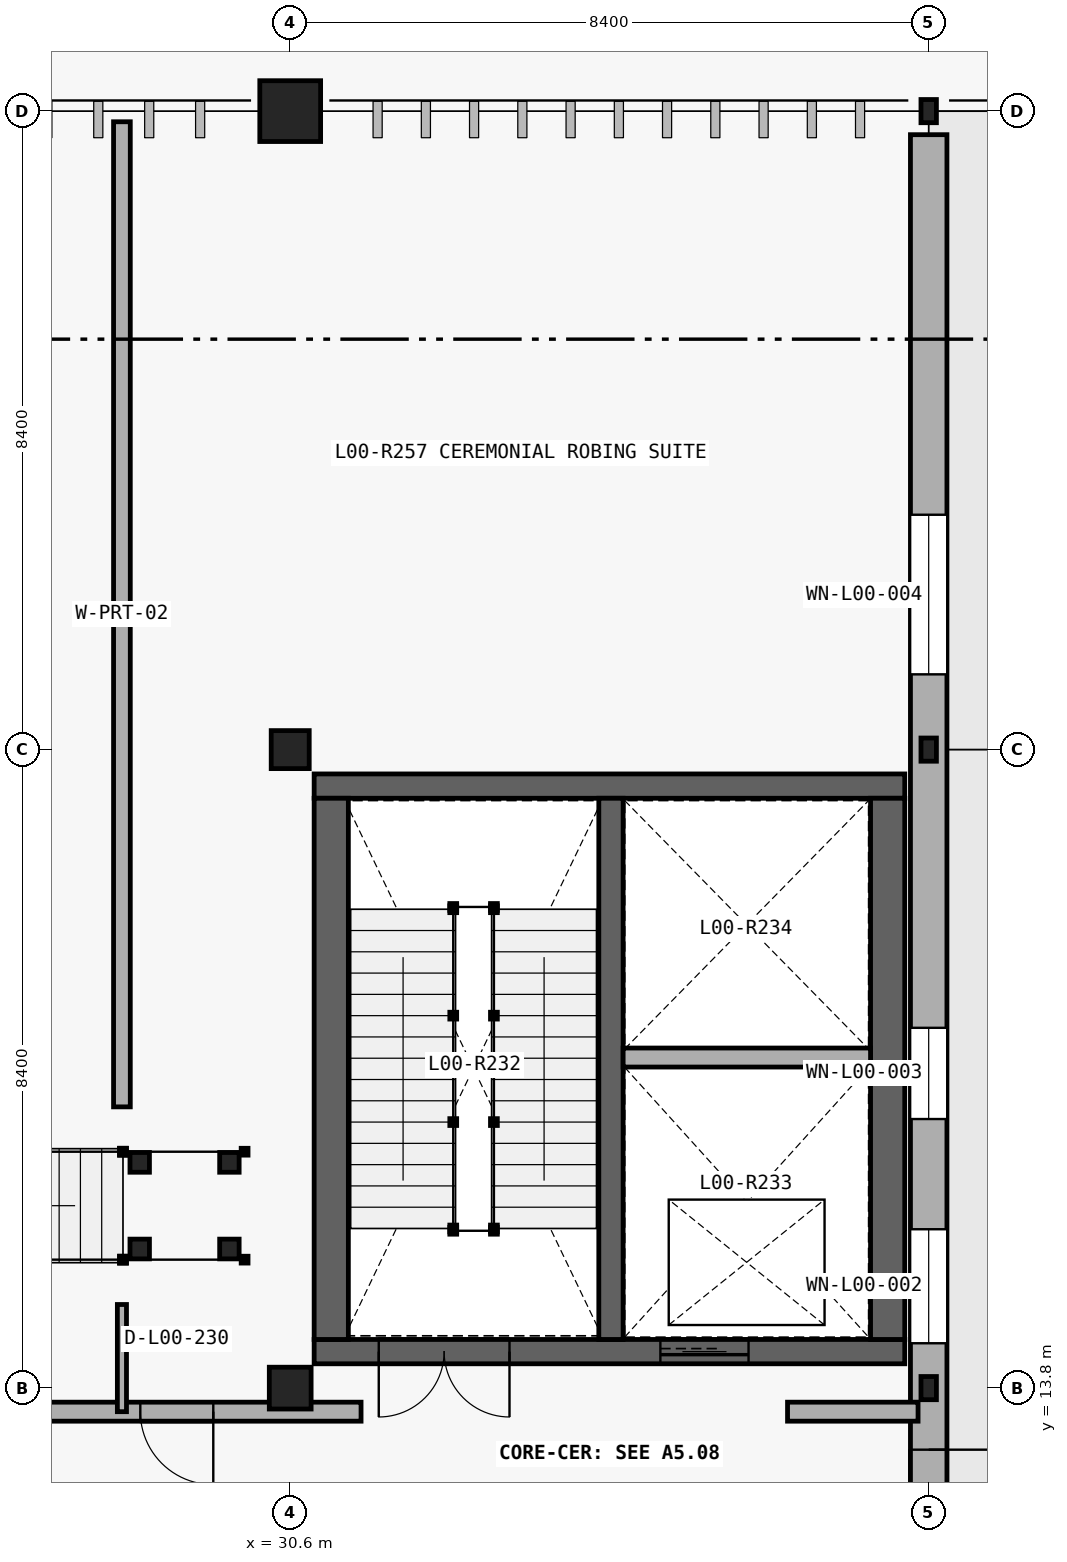
"""IFC4 building model, lengths in metres.
Left out: names, types, materials, properties, quantities, classifications, styles, units other than length and angle.
Written with IfcOpenShell. Run it as: python <this file> out.ifc"""

import sys

from ifc_helpers import new_model, si_unit, direction, frame, frame_2d, origin_with_axes, origin_2d_with_axis, place, context, subcontext, project, spatial, rectangle, hollow_rectangle, circle, i_section, extrude, element, fill, save


model = new_model("IFC4")
c1 = context("Model", 3, precision=1e-05, world=origin_with_axes(), true_north=direction((0.0, 1.0)))
c2 = subcontext(c1, "Body", "Model", "MODEL_VIEW")
j1 = project(units=[si_unit("LENGTHUNIT", "METRE"), si_unit("PLANEANGLEUNIT", "RADIAN")], contexts=[c1])
p1 = place(None, origin_with_axes())
s1 = spatial("IfcSite", under=j1, at=p1, CompositionType="ELEMENT")
p2 = place(p1, origin_with_axes())
s2 = spatial("IfcBuilding", under=s1, at=p2, CompositionType="ELEMENT")
p3 = place(p2, origin_with_axes())
s3 = spatial("IfcBuildingStorey", under=s2, at=p3, CompositionType="ELEMENT", Elevation=0.0)
p4 = place(None, frame((39.0, 6.34, 0.0), z_axis=(0.0, 0.0, 1.0), x_axis=(0.0, 1.0, 0.0)))
e1 = element("IfcWall", 1, at=p4, inside=s3, PredefinedType="SOLIDWALL", context=c2, shape_type="SweptSolid", body=[
    extrude(rectangle(XDim=23.95, YDim=0.48, at=frame_2d((11.975, 0.0), x_axis=(1.0, 0.0))), origin_with_axes(), (0.0, 0.0, 1.0), 4.664),
])
p5 = place(None, frame((39.0, 12.04, 0.0), z_axis=(0.0, 0.0, 1.0), x_axis=(0.0, 1.0, 0.0)))
e2 = element("IfcOpeningElement", 2, at=p5, cuts=e1, PredefinedType="OPENING", context=c2, shape_type="SweptSolid", body=[
    extrude(rectangle(XDim=1.9, YDim=2.4, at=frame_2d((0.0, 1.2), x_axis=(1.0, 0.0))), frame((0.0, 0.25, 0.0), z_axis=(0.0, -1.0, 0.0), x_axis=(1.0, 0.0, 0.0)), (0.0, 0.0, 1.0), 0.5),
])
p6 = place(None, frame((39.0, 9.44, 0.364), z_axis=(0.0, 0.0, 1.0), x_axis=(0.0, 1.0, 0.0)))
e3 = element("IfcOpeningElement", 3, at=p6, cuts=e1, PredefinedType="OPENING", context=c2, shape_type="SweptSolid", body=[
    extrude(rectangle(XDim=1.8, YDim=4.2, at=frame_2d((0.0, 2.1), x_axis=(1.0, 0.0))), frame((0.0, 0.25, 0.0), z_axis=(0.0, -1.0, 0.0), x_axis=(1.0, 0.0, 0.0)), (0.0, 0.0, 1.0), 0.5),
])
p7 = place(None, frame((39.0, 15.14, 0.764), z_axis=(0.0, 0.0, 1.0), x_axis=(0.0, 1.0, 0.0)))
e4 = element("IfcOpeningElement", 4, at=p7, cuts=e1, PredefinedType="OPENING", context=c2, shape_type="SweptSolid", body=[
    extrude(rectangle(XDim=1.5, YDim=3.8, at=frame_2d((0.0, 1.9), x_axis=(1.0, 0.0))), frame((0.0, 0.25, 0.0), z_axis=(0.0, -1.0, 0.0), x_axis=(1.0, 0.0, 0.0)), (0.0, 0.0, 1.0), 0.5),
])
p8 = place(None, frame((39.0, 17.94, 1.1), z_axis=(0.0, 0.0, 1.0), x_axis=(0.0, 1.0, 0.0)))
e5 = element("IfcOpeningElement", 5, at=p8, cuts=e1, PredefinedType="OPENING", context=c2, shape_type="SweptSolid", body=[
    extrude(rectangle(XDim=1.2, YDim=3.4, at=frame_2d((0.0, 1.7), x_axis=(1.0, 0.0))), frame((0.0, 0.25, 0.0), z_axis=(0.0, -1.0, 0.0), x_axis=(1.0, 0.0, 0.0)), (0.0, 0.0, 1.0), 0.5),
])
p9 = place(None, frame((39.0, 24.24, 0.85), z_axis=(0.0, 0.0, 1.0), x_axis=(0.0, 1.0, 0.0)))
e6 = element("IfcOpeningElement", 6, at=p9, cuts=e1, PredefinedType="OPENING", context=c2, shape_type="SweptSolid", body=[
    extrude(rectangle(XDim=2.1, YDim=3.3, at=frame_2d((0.0, 1.65), x_axis=(1.0, 0.0))), frame((0.0, 0.25, 0.0), z_axis=(0.0, -1.0, 0.0), x_axis=(1.0, 0.0, 0.0)), (0.0, 0.0, 1.0), 0.5),
])
p10 = place(None, frame((30.915, 14.28, 0.0), z_axis=(0.0, 0.0, 1.0), x_axis=(1.0, 0.0, 0.0)))
e7 = element("IfcWall", 7, at=p10, inside=s3, PredefinedType="SHEAR", context=c2, shape_type="SweptSolid", body=[
    extrude(rectangle(XDim=7.77, YDim=0.32, at=frame_2d((3.885, 0.0), x_axis=(1.0, 0.0))), origin_with_axes(), (0.0, 0.0, 1.0), 5.4),
])
p11 = place(None, frame((32.625, 14.28, 0.0), z_axis=(0.0, 0.0, 1.0), x_axis=(1.0, 0.0, 0.0)))
e8 = element("IfcOpeningElement", 8, at=p11, cuts=e7, PredefinedType="OPENING", context=c2, shape_type="SweptSolid", body=[
    extrude(rectangle(XDim=1.72, YDim=2.18, at=frame_2d((0.0, 1.09), x_axis=(1.0, 0.0))), frame((0.0, 0.17, 0.0), z_axis=(0.0, -1.0, 0.0), x_axis=(1.0, 0.0, 0.0)), (0.0, 0.0, 1.0), 0.34),
])
p12 = place(None, frame((36.05, 14.28, 0.0), z_axis=(0.0, 0.0, 1.0), x_axis=(1.0, 0.0, 0.0)))
e9 = element("IfcOpeningElement", 9, at=p12, cuts=e7, PredefinedType="OPENING", context=c2, shape_type="SweptSolid", body=[
    extrude(rectangle(XDim=1.16, YDim=2.2, at=frame_2d((0.0, 1.1), x_axis=(1.0, 0.0))), frame((0.0, 0.17, 0.0), z_axis=(0.0, -1.0, 0.0), x_axis=(1.0, 0.0, 0.0)), (0.0, 0.0, 1.0), 0.34),
])
p13 = place(None, frame((38.685, 21.72, 0.0), z_axis=(0.0, 0.0, 1.0), x_axis=(-1.0, 0.0, 0.0)))
e10 = element("IfcWall", 10, at=p13, inside=s3, PredefinedType="SHEAR", context=c2, shape_type="SweptSolid", body=[
    extrude(rectangle(XDim=7.77, YDim=0.32, at=frame_2d((3.885, 0.0), x_axis=(1.0, 0.0))), origin_with_axes(), (0.0, 0.0, 1.0), 5.4),
])
for number, where, z_axis, x_axis in (
    (11, (38.46, 14.44, 0.0), (0.0, 0.0, 1.0), (0.0, 1.0, 0.0)),
    (12, (31.14, 21.56, 0.0), (0.0, 0.0, 1.0), (0.0, -1.0, 0.0)),
):
    element("IfcWall", number, at=place(None, frame(where, z_axis=z_axis, x_axis=x_axis)), inside=s3, PredefinedType="SHEAR", context=c2, shape_type="SweptSolid", body=[
        extrude(rectangle(XDim=7.12, YDim=0.45, at=frame_2d((3.56, 0.0), x_axis=(1.0, 0.0))), origin_with_axes(), (0.0, 0.0, 1.0), 5.4),
    ])
p14 = place(None, frame((34.82, 14.44, 0.0), z_axis=(0.0, 0.0, 1.0), x_axis=(0.0, 1.0, 0.0)))
e13 = element("IfcWall", 13, at=p14, inside=s3, PredefinedType="SHEAR", context=c2, shape_type="SweptSolid", body=[
    extrude(rectangle(XDim=7.12, YDim=0.32, at=frame_2d((3.56, 0.0), x_axis=(1.0, 0.0))), origin_with_axes(), (0.0, 0.0, 1.0), 5.4),
])
p15 = place(None, frame((34.98, 18.149, 0.0), z_axis=(0.0, 0.0, 1.0), x_axis=(1.0, 0.0, 0.0)))
e14 = element("IfcWall", 14, at=p15, inside=s3, PredefinedType="PARTITIONING", context=c2, shape_type="SweptSolid", body=[
    extrude(rectangle(XDim=3.255, YDim=0.25, at=frame_2d((1.627, 0.0), x_axis=(1.0, 0.0))), origin_with_axes(), (0.0, 0.0, 1.0), 5.08),
])
p16 = place(None, frame((6.22, 13.49, 0.0), z_axis=(0.0, 0.0, 1.0), x_axis=(1.0, 0.0, 0.0)))
e15 = element("IfcWall", 15, at=p16, inside=s3, PredefinedType="PARTITIONING", context=c2, shape_type="SweptSolid", body=[
    extrude(rectangle(XDim=25.312, YDim=0.25, at=frame_2d((12.656, 0.0), x_axis=(1.0, 0.0))), origin_with_axes(), (0.0, 0.0, 1.0), 4.15),
])
p17 = place(None, frame((8.342, 13.49, 0.0), z_axis=(0.0, 0.0, 1.0), x_axis=(1.0, 0.0, 0.0)))
e16 = element("IfcOpeningElement", 16, at=p17, cuts=e15, PredefinedType="OPENING", context=c2, shape_type="SweptSolid", body=[
    extrude(rectangle(XDim=0.91, YDim=2.12, at=frame_2d((0.0, 1.06), x_axis=(1.0, 0.0))), frame((0.0, 0.135, 0.0), z_axis=(0.0, -1.0, 0.0), x_axis=(1.0, 0.0, 0.0)), (0.0, 0.0, 1.0), 0.27),
])
p18 = place(None, frame((18.963, 13.49, 0.0), z_axis=(0.0, 0.0, 1.0), x_axis=(1.0, 0.0, 0.0)))
e17 = element("IfcOpeningElement", 17, at=p18, cuts=e15, PredefinedType="OPENING", context=c2, shape_type="SweptSolid", body=[
    extrude(rectangle(XDim=1.0, YDim=2.28, at=frame_2d((0.0, 1.14), x_axis=(1.0, 0.0))), frame((0.0, 0.135, 0.0), z_axis=(0.0, -1.0, 0.0), x_axis=(1.0, 0.0, 0.0)), (0.0, 0.0, 1.0), 0.27),
])
p19 = place(None, frame((29.108, 13.49, 0.0), z_axis=(0.0, 0.0, 1.0), x_axis=(1.0, 0.0, 0.0)))
e18 = element("IfcOpeningElement", 18, at=p19, cuts=e15, PredefinedType="OPENING", context=c2, shape_type="SweptSolid", body=[
    extrude(rectangle(XDim=0.96, YDim=2.2, at=frame_2d((0.0, 1.1), x_axis=(1.0, 0.0))), frame((0.0, 0.135, 0.0), z_axis=(0.0, -1.0, 0.0), x_axis=(1.0, 0.0, 0.0)), (0.0, 0.0, 1.0), 0.27),
])
p20 = place(None, frame((37.143, 13.49, 0.0), z_axis=(0.0, 0.0, 1.0), x_axis=(1.0, 0.0, 0.0)))
e19 = element("IfcWall", 19, at=p20, inside=s3, PredefinedType="PARTITIONING", context=c2, shape_type="SweptSolid", body=[
    extrude(rectangle(XDim=1.717, YDim=0.25, at=frame_2d((0.859, 0.0), x_axis=(1.0, 0.0))), origin_with_axes(), (0.0, 0.0, 1.0), 4.382),
])
p21 = place(None, frame((28.386, 13.49, 0.0), z_axis=(0.0, 0.0, 1.0), x_axis=(0.0, 1.0, 0.0)))
e20 = element("IfcWall", 20, at=p21, inside=s3, PredefinedType="PARTITIONING", context=c2, shape_type="SweptSolid", body=[
    extrude(rectangle(XDim=1.41, YDim=0.12, at=frame_2d((0.705, 0.0), x_axis=(1.0, 0.0))), origin_with_axes(), (0.0, 0.0, 1.0), 5.08),
])
p22 = place(None, frame((28.386, 17.5, 0.0), z_axis=(0.0, 0.0, 1.0), x_axis=(0.0, 1.0, 0.0)))
e21 = element("IfcWall", 21, at=p22, inside=s3, PredefinedType="PARTITIONING", context=c2, shape_type="SweptSolid", body=[
    extrude(rectangle(XDim=12.96, YDim=0.22, at=frame_2d((6.48, 0.0), x_axis=(1.0, 0.0))), origin_with_axes(), (0.0, 0.0, 1.0), 5.08),
])
p23 = place(None, frame((30.6, 13.8, 0.0), z_axis=(0.0, 0.0, 1.0), x_axis=(1.0, 0.0, 0.0)))
e22 = element("IfcColumn", 22, at=p23, inside=s3, PredefinedType="COLUMN", context=c2, shape_type="SweptSolid", body=[
    extrude(i_section(OverallWidth=0.55, OverallDepth=0.55, WebThickness=0.025, FlangeThickness=0.042, at=origin_2d_with_axis()), origin_with_axes(), (0.0, 0.0, 1.0), 5.4),
])
p24 = place(None, frame((30.6, 22.2, 0.0), z_axis=(0.0, 0.0, 1.0), x_axis=(1.0, 0.0, 0.0)))
e23 = element("IfcColumn", 23, at=p24, inside=s3, PredefinedType="COLUMN", context=c2, shape_type="SweptSolid", body=[
    extrude(i_section(OverallWidth=0.5, OverallDepth=0.5, WebThickness=0.022, FlangeThickness=0.036, at=origin_2d_with_axis()), origin_with_axes(), (0.0, 0.0, 1.0), 5.4),
])
p25 = place(None, frame((30.6, 30.6, 0.0), z_axis=(0.0, 0.0, 1.0), x_axis=(1.0, 0.0, 0.0)))
e24 = element("IfcColumn", 24, at=p25, inside=s3, PredefinedType="COLUMN", context=c2, shape_type="SweptSolid", body=[
    extrude(circle(Radius=0.4, at=origin_2d_with_axis()), origin_with_axes(), (0.0, 0.0, 1.0), 5.4),
])
for number, where, z_axis, x_axis in (
    (25, (39.0, 13.8, 0.0), (0.0, 0.0, 1.0), (1.0, 0.0, 0.0)),
    (26, (39.0, 22.2, 0.0), (0.0, 0.0, 1.0), (1.0, 0.0, 0.0)),
    (27, (39.0, 30.6, 0.0), (0.0, 0.0, 1.0), (1.0, 0.0, 0.0)),
):
    element("IfcColumn", number, at=place(None, frame(where, z_axis=z_axis, x_axis=x_axis)), inside=s3, PredefinedType="COLUMN", context=c2, shape_type="SweptSolid", body=[
        extrude(hollow_rectangle(XDim=0.203, YDim=0.305, WallThickness=0.013, InnerFilletRadius=0.025, OuterFilletRadius=0.013, at=origin_2d_with_axis()), origin_with_axes(), (0.0, 0.0, 1.0), 5.4),
    ])
for number, where, z_axis, x_axis in (
    (28, (28.62, 15.63, -0.28), (0.0, 0.0, 1.0), (1.0, 0.0, 0.0)),
    (29, (28.62, 16.77, -0.28), (0.0, 0.0, 1.0), (1.0, 0.0, 0.0)),
    (30, (29.8, 15.63, -0.28), (0.0, 0.0, 1.0), (1.0, 0.0, 0.0)),
    (31, (29.8, 16.77, -0.28), (0.0, 0.0, 1.0), (1.0, 0.0, 0.0)),
):
    element("IfcColumn", number, at=place(None, frame(where, z_axis=z_axis, x_axis=x_axis)), inside=s3, PredefinedType="COLUMN", context=c2, shape_type="SweptSolid", body=[
        extrude(i_section(OverallWidth=0.256, OverallDepth=0.26, WebThickness=0.011, FlangeThickness=0.017, at=origin_2d_with_axis()), origin_with_axes(), (0.0, 0.0, 1.0), 5.5),
    ])
p26 = place(None, frame((39.0, 12.04, 0.0), z_axis=(0.0, 0.0, 1.0), x_axis=(0.0, -1.0, 0.0)))
e32 = element("IfcDoor", 32, at=p26, inside=s3, OperationType="DOUBLE_DOOR_SINGLE_SWING", PredefinedType="DOOR", context=c2, shape_type="SweptSolid", body=[
    extrude(rectangle(XDim=1.9, YDim=2.4, at=frame_2d((0.0, 1.2), x_axis=(1.0, 0.0))), frame((0.0, 0.04, 0.0), z_axis=(0.0, -1.0, 0.0), x_axis=(1.0, 0.0, 0.0)), (0.0, 0.0, 1.0), 0.08),
])
fill(e2, e32)
p27 = place(None, frame((32.625, 14.28, 0.0), z_axis=(0.0, 0.0, 1.0), x_axis=(-1.0, 0.0, 0.0)))
e33 = element("IfcDoor", 33, at=p27, inside=s3, OperationType="DOUBLE_DOOR_SINGLE_SWING", PredefinedType="DOOR", context=c2, shape_type="SweptSolid", body=[
    extrude(rectangle(XDim=1.72, YDim=2.18, at=frame_2d((0.0, 1.09), x_axis=(1.0, 0.0))), frame((0.0, 0.04, 0.0), z_axis=(0.0, -1.0, 0.0), x_axis=(1.0, 0.0, 0.0)), (0.0, 0.0, 1.0), 0.08),
])
fill(e8, e33)
p28 = place(None, frame((36.05, 14.28, 0.0), z_axis=(0.0, 0.0, 1.0), x_axis=(-1.0, 0.0, 0.0)))
e34 = element("IfcDoor", 34, at=p28, inside=s3, OperationType="SLIDING_TO_LEFT", PredefinedType="DOOR", context=c2, shape_type="SweptSolid", body=[
    extrude(rectangle(XDim=1.16, YDim=2.2, at=frame_2d((0.0, 1.1), x_axis=(1.0, 0.0))), frame((0.0, 0.04, 0.0), z_axis=(0.0, -1.0, 0.0), x_axis=(1.0, 0.0, 0.0)), (0.0, 0.0, 1.0), 0.08),
])
fill(e9, e34)
p29 = place(None, frame((29.108, 13.49, 0.0), z_axis=(0.0, 0.0, 1.0), x_axis=(-1.0, 0.0, 0.0)))
e35 = element("IfcDoor", 35, at=p29, inside=s3, OperationType="SINGLE_SWING_RIGHT", PredefinedType="DOOR", context=c2, shape_type="SweptSolid", body=[
    extrude(rectangle(XDim=0.96, YDim=2.2, at=frame_2d((0.0, 1.1), x_axis=(1.0, 0.0))), frame((0.0, 0.04, 0.0), z_axis=(0.0, -1.0, 0.0), x_axis=(1.0, 0.0, 0.0)), (0.0, 0.0, 1.0), 0.08),
])
fill(e18, e35)
p30 = place(None, frame((39.0, 15.14, 0.764), z_axis=(0.0, 0.0, 1.0), x_axis=(0.0, 1.0, 0.0)))
e36 = element("IfcWindow", 36, at=p30, inside=s3, PartitioningType="SINGLE_PANEL", PredefinedType="WINDOW", context=c2, shape_type="SweptSolid", body=[
    extrude(rectangle(XDim=1.5, YDim=3.8, at=frame_2d((0.0, 1.9), x_axis=(1.0, 0.0))), frame((0.0, 0.03, 0.0), z_axis=(0.0, -1.0, 0.0), x_axis=(1.0, 0.0, 0.0)), (0.0, 0.0, 1.0), 0.06),
])
fill(e4, e36)
p31 = place(None, frame((39.0, 17.94, 1.1), z_axis=(0.0, 0.0, 1.0), x_axis=(0.0, 1.0, 0.0)))
e37 = element("IfcWindow", 37, at=p31, inside=s3, PartitioningType="SINGLE_PANEL", PredefinedType="WINDOW", context=c2, shape_type="SweptSolid", body=[
    extrude(rectangle(XDim=1.2, YDim=3.4, at=frame_2d((0.0, 1.7), x_axis=(1.0, 0.0))), frame((0.0, 0.03, 0.0), z_axis=(0.0, -1.0, 0.0), x_axis=(1.0, 0.0, 0.0)), (0.0, 0.0, 1.0), 0.06),
])
fill(e5, e37)
p32 = place(None, frame((39.0, 24.24, 0.85), z_axis=(0.0, 0.0, 1.0), x_axis=(0.0, 1.0, 0.0)))
e38 = element("IfcWindow", 38, at=p32, inside=s3, PartitioningType="SINGLE_PANEL", PredefinedType="WINDOW", context=c2, shape_type="SweptSolid", body=[
    extrude(rectangle(XDim=2.1, YDim=3.3, at=frame_2d((0.0, 1.65), x_axis=(1.0, 0.0))), frame((0.0, 0.03, 0.0), z_axis=(0.0, -1.0, 0.0), x_axis=(1.0, 0.0, 0.0)), (0.0, 0.0, 1.0), 0.06),
])
fill(e6, e38)
save(model, sys.argv[1])
